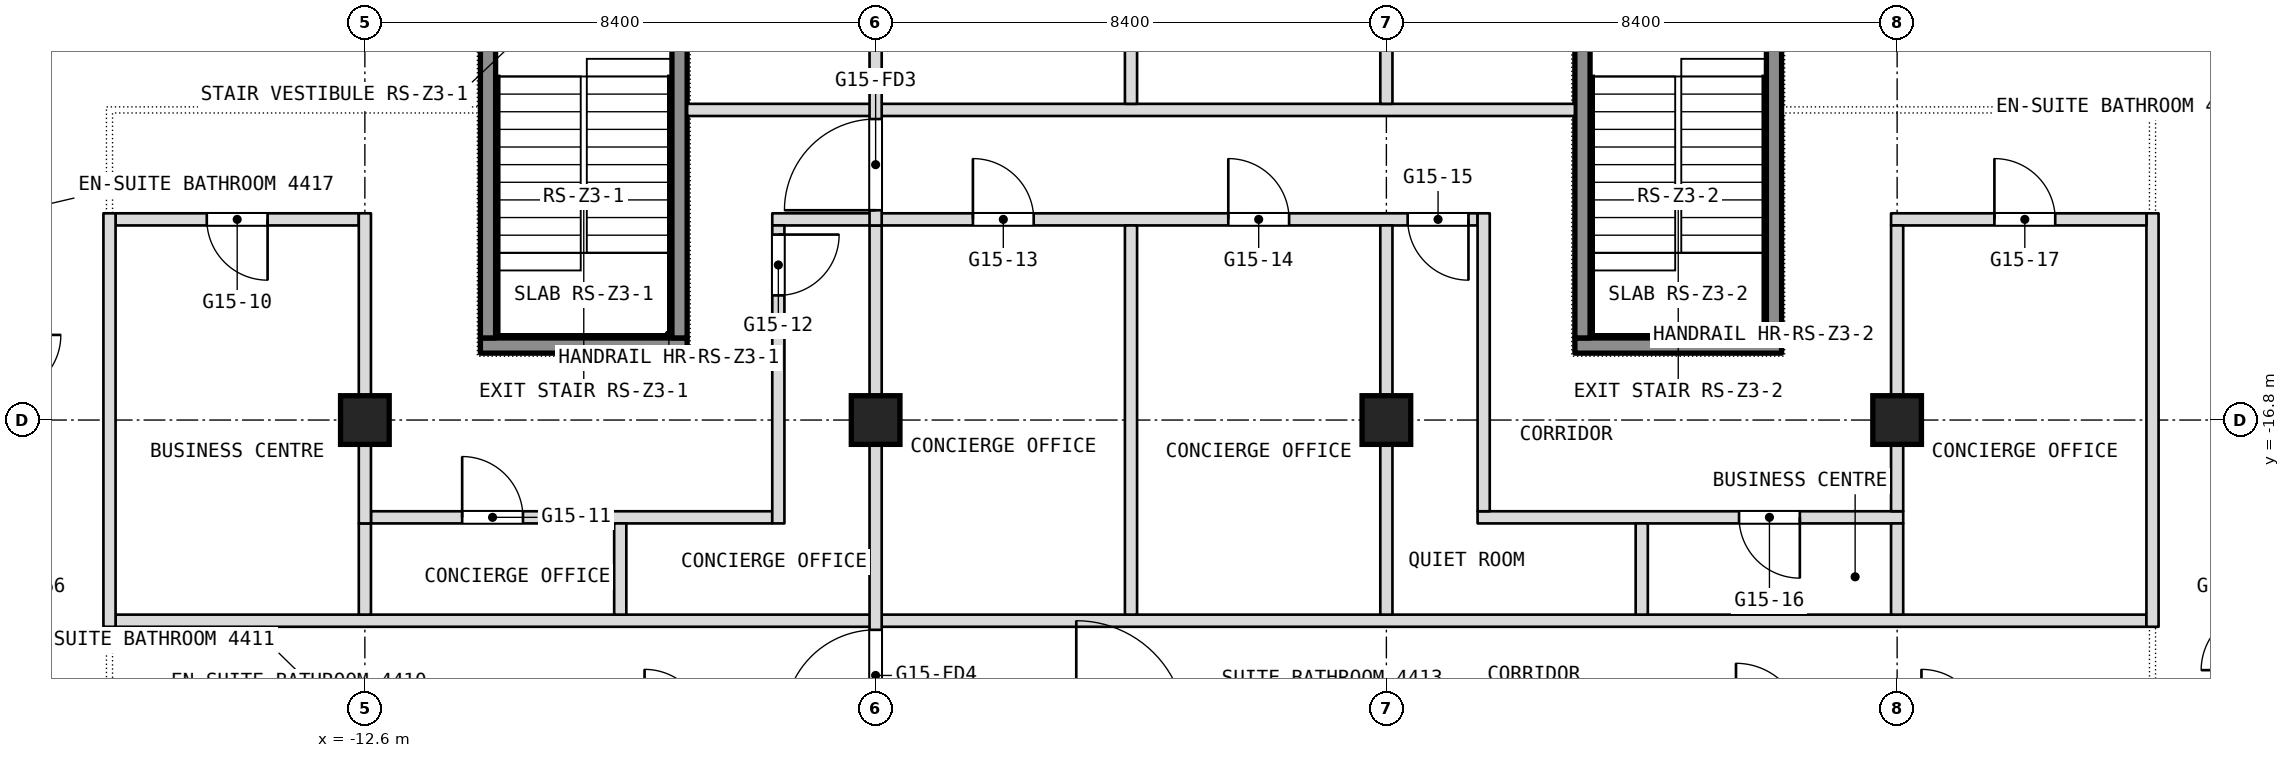
"""IFC4 building model, lengths in metres.
Left out: names, types, materials, properties, quantities, classifications, styles, units other than length and angle.
Written with IfcOpenShell. Run it as: python <this file> out.ifc"""

import sys

from ifc_helpers import new_model, si_unit, direction, frame, frame_2d, origin, origin_2d, place, context, subcontext, project, spatial, rectangle, extrude, element, fill, save


model = new_model("IFC4")
c1 = context("Model", 3, precision=1e-05, world=origin(), true_north=direction((0.0, 1.0)))
c2 = subcontext(c1, "Body", "Model", "MODEL_VIEW")
j1 = project(units=[si_unit("LENGTHUNIT", "METRE"), si_unit("PLANEANGLEUNIT", "RADIAN")], contexts=[c1])
p1 = place(None, origin())
s1 = spatial("IfcSite", under=j1, at=p1, CompositionType="ELEMENT")
p2 = place(p1, origin())
s2 = spatial("IfcBuilding", under=s1, at=p2, CompositionType="ELEMENT")
p3 = place(p2, frame((0.0, 0.0, 194.9)))
s3 = spatial("IfcBuildingStorey", under=s2, at=p3, CompositionType="ELEMENT", Elevation=194.9)
for number, where, z_axis, x_axis in (
    (1, (-12.6, -16.8, 0.0), (0.0, 0.0, 1.0), (1.0, 0.0, 0.0)),
    (2, (-4.2, -16.8, 0.0), (0.0, 0.0, 1.0), (1.0, 0.0, 0.0)),
    (3, (4.2, -16.8, 0.0), (0.0, 0.0, 1.0), (1.0, 0.0, 0.0)),
    (4, (12.6, -16.8, 0.0), (0.0, 0.0, 1.0), (1.0, 0.0, 0.0)),
):
    element("IfcColumn", number, at=place(p3, frame(where, z_axis=z_axis, x_axis=x_axis)), inside=s3, PredefinedType="COLUMN", context=c2, shape_type="SweptSolid", body=[
        extrude(rectangle(XDim=0.8, YDim=0.8, at=origin_2d()), origin(), (0.0, 0.0, 1.0), 3.6),
    ])
p4 = place(p3, frame((-16.7, -20.1, 0.0), z_axis=(0.0, 0.0, 1.0), x_axis=(1.0, 0.0, 0.0)))
e5 = element("IfcWall", 5, at=p4, inside=s3, PredefinedType="PARTITIONING", context=c2, shape_type="SweptSolid", body=[
    extrude(rectangle(XDim=33.4, YDim=0.2, at=frame_2d((16.7, 0.0))), origin(), (0.0, 0.0, 1.0), 3.34),
])
p5 = place(p3, frame((-12.5, -18.4, 0.0), z_axis=(0.0, 0.0, 1.0), x_axis=(1.0, 0.0, 0.0)))
e6 = element("IfcWall", 6, at=p5, inside=s3, PredefinedType="PARTITIONING", context=c2, shape_type="SweptSolid", body=[
    extrude(rectangle(XDim=6.6, YDim=0.2, at=frame_2d((3.3, 0.0))), origin(), (0.0, 0.0, 1.0), 3.34),
])
p6 = place(p5, frame((1.5, 0.0, 0.0)))
e7 = element("IfcOpeningElement", 7, at=p6, cuts=e6, PredefinedType="OPENING", context=c2, shape_type="SweptSolid", body=[
    extrude(rectangle(XDim=1.0, YDim=2.1, at=frame_2d((0.5, 1.05))), frame((0.0, 0.1, 0.0), z_axis=(0.0, -1.0, 0.0), x_axis=(1.0, 0.0, 0.0)), (0.0, 0.0, 1.0), 0.2),
])
p7 = place(p3, frame((5.7, -18.4, 0.0), z_axis=(0.0, 0.0, 1.0), x_axis=(1.0, 0.0, 0.0)))
e8 = element("IfcWall", 8, at=p7, inside=s3, PredefinedType="PARTITIONING", context=c2, shape_type="SweptSolid", body=[
    extrude(rectangle(XDim=7.0, YDim=0.2, at=frame_2d((3.5, 0.0))), origin(), (0.0, 0.0, 1.0), 3.34),
])
p8 = place(p7, frame((4.3, 0.0, 0.0)))
e9 = element("IfcOpeningElement", 9, at=p8, cuts=e8, PredefinedType="OPENING", context=c2, shape_type="SweptSolid", body=[
    extrude(rectangle(XDim=1.0, YDim=2.1, at=frame_2d((0.5, 1.05))), frame((0.0, 0.1, 0.0), z_axis=(0.0, -1.0, 0.0), x_axis=(1.0, 0.0, 0.0)), (0.0, 0.0, 1.0), 0.2),
])
p9 = place(p3, frame((16.8, -20.2, 0.0), z_axis=(0.0, 0.0, 1.0), x_axis=(0.0, 1.0, 0.0)))
e10 = element("IfcWall", 10, at=p9, inside=s3, PredefinedType="PARTITIONING", context=c2, shape_type="SweptSolid", body=[
    extrude(rectangle(XDim=6.8, YDim=0.2, at=frame_2d((3.4, 0.0))), origin(), (0.0, 0.0, 1.0), 3.34),
])
p10 = place(p3, frame((-16.7, -13.5, 0.0), z_axis=(0.0, 0.0, 1.0), x_axis=(1.0, 0.0, 0.0)))
e11 = element("IfcWall", 11, at=p10, inside=s3, PredefinedType="PARTITIONING", context=c2, shape_type="SweptSolid", body=[
    extrude(rectangle(XDim=4.0, YDim=0.2, at=frame_2d((2.0, 0.0))), origin(), (0.0, 0.0, 1.0), 3.34),
])
p11 = place(p10, frame((1.5, 0.0, 0.0)))
e12 = element("IfcOpeningElement", 12, at=p11, cuts=e11, PredefinedType="OPENING", context=c2, shape_type="SweptSolid", body=[
    extrude(rectangle(XDim=1.0, YDim=2.1, at=frame_2d((0.5, 1.05))), frame((0.0, 0.1, 0.0), z_axis=(0.0, -1.0, 0.0), x_axis=(1.0, 0.0, 0.0)), (0.0, 0.0, 1.0), 0.2),
])
p12 = place(p3, frame((-5.9, -13.5, 0.0), z_axis=(0.0, 0.0, 1.0), x_axis=(1.0, 0.0, 0.0)))
e13 = element("IfcWall", 13, at=p12, inside=s3, PredefinedType="PARTITIONING", context=c2, shape_type="SweptSolid", body=[
    extrude(rectangle(XDim=11.6, YDim=0.2, at=frame_2d((5.8, 0.0))), origin(), (0.0, 0.0, 1.0), 3.34),
])
p13 = place(p12, frame((3.3, 0.0, 0.0)))
e14 = element("IfcOpeningElement", 14, at=p13, cuts=e13, PredefinedType="OPENING", context=c2, shape_type="SweptSolid", body=[
    extrude(rectangle(XDim=1.0, YDim=2.1, at=frame_2d((0.5, 1.05))), frame((0.0, 0.1, 0.0), z_axis=(0.0, -1.0, 0.0), x_axis=(1.0, 0.0, 0.0)), (0.0, 0.0, 1.0), 0.2),
])
p14 = place(p12, frame((7.5, 0.0, 0.0)))
e15 = element("IfcOpeningElement", 15, at=p14, cuts=e13, PredefinedType="OPENING", context=c2, shape_type="SweptSolid", body=[
    extrude(rectangle(XDim=1.0, YDim=2.1, at=frame_2d((0.5, 1.05))), frame((0.0, 0.1, 0.0), z_axis=(0.0, -1.0, 0.0), x_axis=(1.0, 0.0, 0.0)), (0.0, 0.0, 1.0), 0.2),
])
p15 = place(p12, frame((10.45, 0.0, 0.0)))
e16 = element("IfcOpeningElement", 16, at=p15, cuts=e13, PredefinedType="OPENING", context=c2, shape_type="SweptSolid", body=[
    extrude(rectangle(XDim=1.0, YDim=2.1, at=frame_2d((0.5, 1.05))), frame((0.0, 0.1, 0.0), z_axis=(0.0, -1.0, 0.0), x_axis=(1.0, 0.0, 0.0)), (0.0, 0.0, 1.0), 0.2),
])
p16 = place(p3, frame((12.5, -13.5, 0.0), z_axis=(0.0, 0.0, 1.0), x_axis=(1.0, 0.0, 0.0)))
e17 = element("IfcWall", 17, at=p16, inside=s3, PredefinedType="PARTITIONING", context=c2, shape_type="SweptSolid", body=[
    extrude(rectangle(XDim=4.2, YDim=0.2, at=frame_2d((2.1, 0.0))), origin(), (0.0, 0.0, 1.0), 3.34),
])
p17 = place(p16, frame((1.7, 0.0, 0.0)))
e18 = element("IfcOpeningElement", 18, at=p17, cuts=e17, PredefinedType="OPENING", context=c2, shape_type="SweptSolid", body=[
    extrude(rectangle(XDim=1.0, YDim=2.1, at=frame_2d((0.5, 1.05))), frame((0.0, 0.1, 0.0), z_axis=(0.0, -1.0, 0.0), x_axis=(1.0, 0.0, 0.0)), (0.0, 0.0, 1.0), 0.2),
])
p18 = place(p3, frame((12.6, -20.0, 0.0), z_axis=(0.0, 0.0, 1.0), x_axis=(0.0, 1.0, 0.0)))
e19 = element("IfcWall", 19, at=p18, inside=s3, PredefinedType="PARTITIONING", context=c2, shape_type="SweptSolid", body=[
    extrude(rectangle(XDim=1.5, YDim=0.2, at=frame_2d((0.75, 0.0))), origin(), (0.0, 0.0, 1.0), 3.34),
])
p19 = place(p3, frame((12.6, -18.3, 0.0), z_axis=(0.0, 0.0, 1.0), x_axis=(0.0, 1.0, 0.0)))
e20 = element("IfcWall", 20, at=p19, inside=s3, PredefinedType="PARTITIONING", context=c2, shape_type="SweptSolid", body=[
    extrude(rectangle(XDim=4.7, YDim=0.2, at=frame_2d((2.35, 0.0))), origin(), (0.0, 0.0, 1.0), 3.34),
])
p20 = place(p3, frame((-7.3, -11.7, 0.0), z_axis=(0.0, 0.0, 1.0), x_axis=(1.0, 0.0, 0.0)))
e21 = element("IfcWall", 21, at=p20, inside=s3, PredefinedType="PARTITIONING", context=c2, shape_type="SweptSolid", body=[
    extrude(rectangle(XDim=14.6, YDim=0.2, at=frame_2d((7.3, 0.0))), origin(), (0.0, 0.0, 1.0), 3.34),
])
p21 = place(p3, frame((8.4, -20.0, 0.0), z_axis=(0.0, 0.0, 1.0), x_axis=(0.0, 1.0, 0.0)))
e22 = element("IfcWall", 22, at=p21, inside=s3, PredefinedType="PARTITIONING", context=c2, shape_type="SweptSolid", body=[
    extrude(rectangle(XDim=1.5, YDim=0.2, at=frame_2d((0.75, 0.0))), origin(), (0.0, 0.0, 1.0), 3.34),
])
p22 = place(p3, frame((5.8, -18.3, 0.0), z_axis=(0.0, 0.0, 1.0), x_axis=(0.0, 1.0, 0.0)))
e23 = element("IfcWall", 23, at=p22, inside=s3, PredefinedType="PARTITIONING", context=c2, shape_type="SweptSolid", body=[
    extrude(rectangle(XDim=4.9, YDim=0.2, at=frame_2d((2.45, 0.0))), origin(), (0.0, 0.0, 1.0), 3.34),
])
p23 = place(p3, frame((4.2, -20.0, 0.0), z_axis=(0.0, 0.0, 1.0), x_axis=(0.0, 1.0, 0.0)))
e24 = element("IfcWall", 24, at=p23, inside=s3, PredefinedType="PARTITIONING", context=c2, shape_type="SweptSolid", body=[
    extrude(rectangle(XDim=6.4, YDim=0.2, at=frame_2d((3.2, 0.0))), origin(), (0.0, 0.0, 1.0), 3.34),
])
p24 = place(p3, frame((4.2, -11.6, 0.0), z_axis=(0.0, 0.0, 1.0), x_axis=(0.0, 1.0, 0.0)))
e25 = element("IfcWall", 25, at=p24, inside=s3, PredefinedType="PARTITIONING", context=c2, shape_type="SweptSolid", body=[
    extrude(rectangle(XDim=9.7, YDim=0.2, at=frame_2d((4.85, 0.0))), origin(), (0.0, 0.0, 1.0), 3.34),
])
p25 = place(p3, frame((0.0, -20.0, 0.0), z_axis=(0.0, 0.0, 1.0), x_axis=(0.0, 1.0, 0.0)))
e26 = element("IfcWall", 26, at=p25, inside=s3, PredefinedType="PARTITIONING", context=c2, shape_type="SweptSolid", body=[
    extrude(rectangle(XDim=6.4, YDim=0.2, at=frame_2d((3.2, 0.0))), origin(), (0.0, 0.0, 1.0), 3.34),
])
p26 = place(p3, frame((0.0, -11.6, 0.0), z_axis=(0.0, 0.0, 1.0), x_axis=(0.0, 1.0, 0.0)))
e27 = element("IfcWall", 27, at=p26, inside=s3, PredefinedType="PARTITIONING", context=c2, shape_type="SweptSolid", body=[
    extrude(rectangle(XDim=9.7, YDim=0.2, at=frame_2d((4.85, 0.0))), origin(), (0.0, 0.0, 1.0), 3.34),
])
p27 = place(p3, frame((-4.2, -22.0, 0.0), z_axis=(0.0, 0.0, 1.0), x_axis=(0.0, 1.0, 0.0)))
e28 = element("IfcWall", 28, at=p27, inside=s3, PredefinedType="PARTITIONING", context=c2, shape_type="SweptSolid", body=[
    extrude(rectangle(XDim=8.4, YDim=0.2, at=frame_2d((4.2, 0.0))), origin(), (0.0, 0.0, 1.0), 3.34),
])
p28 = place(p27, frame((0.25, 0.0, 0.0)))
e29 = element("IfcOpeningElement", 29, at=p28, cuts=e28, PredefinedType="OPENING", context=c2, shape_type="SweptSolid", body=[
    extrude(rectangle(XDim=1.5, YDim=2.1, at=frame_2d((0.75, 1.05))), frame((0.0, 0.1, 0.0), z_axis=(0.0, -1.0, 0.0), x_axis=(1.0, 0.0, 0.0)), (0.0, 0.0, 1.0), 0.2),
])
p29 = place(p3, frame((-4.2, -13.6, 0.0), z_axis=(0.0, 0.0, 1.0), x_axis=(0.0, 1.0, 0.0)))
e30 = element("IfcWall", 30, at=p29, inside=s3, PredefinedType="PARTITIONING", context=c2, shape_type="SweptSolid", body=[
    extrude(rectangle(XDim=13.6, YDim=0.2, at=frame_2d((6.8, 0.0))), origin(), (0.0, 0.0, 1.0), 3.34),
])
p30 = place(p29, frame((11.95, 0.0, 0.0)))
e31 = element("IfcOpeningElement", 31, at=p30, cuts=e30, PredefinedType="OPENING", context=c2, shape_type="SweptSolid", body=[
    extrude(rectangle(XDim=1.5, YDim=2.1, at=frame_2d((0.75, 1.05))), frame((0.0, 0.1, 0.0), z_axis=(0.0, -1.0, 0.0), x_axis=(1.0, 0.0, 0.0)), (0.0, 0.0, 1.0), 0.2),
])
p31 = place(p29, frame((0.25, 0.0, 0.0)))
e32 = element("IfcOpeningElement", 32, at=p31, cuts=e30, PredefinedType="OPENING", context=c2, shape_type="SweptSolid", body=[
    extrude(rectangle(XDim=1.5, YDim=2.1, at=frame_2d((0.75, 1.05))), frame((0.0, 0.1, 0.0), z_axis=(0.0, -1.0, 0.0), x_axis=(1.0, 0.0, 0.0)), (0.0, 0.0, 1.0), 0.2),
])
p32 = place(p3, frame((-5.8, -18.5, 0.0), z_axis=(0.0, 0.0, 1.0), x_axis=(0.0, 1.0, 0.0)))
e33 = element("IfcWall", 33, at=p32, inside=s3, PredefinedType="PARTITIONING", context=c2, shape_type="SweptSolid", body=[
    extrude(rectangle(XDim=4.9, YDim=0.2, at=frame_2d((2.45, 0.0))), origin(), (0.0, 0.0, 1.0), 3.34),
])
p33 = place(p32, frame((3.75, 0.0, 0.0)))
e34 = element("IfcOpeningElement", 34, at=p33, cuts=e33, PredefinedType="OPENING", context=c2, shape_type="SweptSolid", body=[
    extrude(rectangle(XDim=1.0, YDim=2.1, at=frame_2d((0.5, 1.05))), frame((0.0, 0.1, 0.0), z_axis=(0.0, -1.0, 0.0), x_axis=(1.0, 0.0, 0.0)), (0.0, 0.0, 1.0), 0.2),
])
for number, where, z_axis, x_axis in (
    (35, (-8.4, -20.0, 0.0), (0.0, 0.0, 1.0), (0.0, 1.0, 0.0)),
    (36, (-12.6, -20.0, 0.0), (0.0, 0.0, 1.0), (0.0, 1.0, 0.0)),
):
    element("IfcWall", number, at=place(p3, frame(where, z_axis=z_axis, x_axis=x_axis)), inside=s3, PredefinedType="PARTITIONING", context=c2, shape_type="SweptSolid", body=[
        extrude(rectangle(XDim=1.5, YDim=0.2, at=frame_2d((0.75, 0.0))), origin(), (0.0, 0.0, 1.0), 3.34),
    ])
p34 = place(p3, frame((-12.6, -18.5, 0.0), z_axis=(0.0, 0.0, 1.0), x_axis=(0.0, 1.0, 0.0)))
e37 = element("IfcWall", 37, at=p34, inside=s3, PredefinedType="PARTITIONING", context=c2, shape_type="SweptSolid", body=[
    extrude(rectangle(XDim=5.1, YDim=0.2, at=frame_2d((2.55, 0.0))), origin(), (0.0, 0.0, 1.0), 3.34),
])
p35 = place(p3, frame((-16.8, -20.2, 0.0), z_axis=(0.0, 0.0, 1.0), x_axis=(0.0, 1.0, 0.0)))
e38 = element("IfcWall", 38, at=p35, inside=s3, PredefinedType="PARTITIONING", context=c2, shape_type="SweptSolid", body=[
    extrude(rectangle(XDim=6.8, YDim=0.2, at=frame_2d((3.4, 0.0))), origin(), (0.0, 0.0, 1.0), 3.34),
])
p36 = place(p3, frame((-10.7, -15.575, 0.1), z_axis=(0.0, 0.0, 1.0), x_axis=(1.0, 0.0, 0.0)))
e39 = element("IfcWall", 39, at=p36, inside=s3, PredefinedType="SHEAR", context=c2, shape_type="SweptSolid", body=[
    extrude(rectangle(XDim=3.4, YDim=0.25, at=frame_2d((1.7, 0.0))), origin(), (0.0, 0.0, 1.0), 3.6),
])
for number, where, z_axis, x_axis in (
    (40, (-10.575, -15.45, 0.1), (0.0, 0.0, 1.0), (0.0, 1.0, 0.0)),
    (41, (-7.425, -15.45, 0.1), (0.0, 0.0, 1.0), (0.0, 1.0, 0.0)),
):
    element("IfcWall", number, at=place(p3, frame(where, z_axis=z_axis, x_axis=x_axis)), inside=s3, PredefinedType="SHEAR", context=c2, shape_type="SweptSolid", body=[
        extrude(rectangle(XDim=5.7, YDim=0.25, at=frame_2d((2.85, 0.0))), origin(), (0.0, 0.0, 1.0), 3.6),
    ])
p37 = place(p3, frame((7.3, -15.575, 0.1), z_axis=(0.0, 0.0, 1.0), x_axis=(1.0, 0.0, 0.0)))
e42 = element("IfcWall", 42, at=p37, inside=s3, PredefinedType="SHEAR", context=c2, shape_type="SweptSolid", body=[
    extrude(rectangle(XDim=3.4, YDim=0.25, at=frame_2d((1.7, 0.0))), origin(), (0.0, 0.0, 1.0), 3.6),
])
for number, where, z_axis, x_axis in (
    (43, (7.425, -15.45, 0.1), (0.0, 0.0, 1.0), (0.0, 1.0, 0.0)),
    (44, (10.575, -15.45, 0.1), (0.0, 0.0, 1.0), (0.0, 1.0, 0.0)),
):
    element("IfcWall", number, at=place(p3, frame(where, z_axis=z_axis, x_axis=x_axis)), inside=s3, PredefinedType="SHEAR", context=c2, shape_type="SweptSolid", body=[
        extrude(rectangle(XDim=5.7, YDim=0.25, at=frame_2d((2.85, 0.0))), origin(), (0.0, 0.0, 1.0), 3.6),
    ])
p38 = place(p6, origin())
e45 = element("IfcDoor", 45, at=p38, inside=s3, OperationType="SINGLE_SWING_RIGHT", PredefinedType="DOOR", context=c2, shape_type="SweptSolid", body=[
    extrude(rectangle(XDim=1.0, YDim=2.1, at=frame_2d((0.5, 1.05))), frame((0.0, 0.025, 0.0), z_axis=(0.0, -1.0, 0.0), x_axis=(1.0, 0.0, 0.0)), (0.0, 0.0, 1.0), 0.05),
])
fill(e7, e45)
p39 = place(p8, origin())
e46 = element("IfcDoor", 46, at=p39, inside=s3, OperationType="SINGLE_SWING_LEFT", PredefinedType="DOOR", context=c2, shape_type="SweptSolid", body=[
    extrude(rectangle(XDim=1.0, YDim=2.1, at=frame_2d((0.5, 1.05))), frame((0.0, 0.025, 0.0), z_axis=(0.0, -1.0, 0.0), x_axis=(1.0, 0.0, 0.0)), (0.0, 0.0, 1.0), 0.05),
])
fill(e9, e46)
p40 = place(p11, origin())
e47 = element("IfcDoor", 47, at=p40, inside=s3, OperationType="SINGLE_SWING_RIGHT", PredefinedType="DOOR", context=c2, shape_type="SweptSolid", body=[
    extrude(rectangle(XDim=1.0, YDim=2.1, at=frame_2d((0.5, 1.05))), frame((0.0, 0.025, 0.0), z_axis=(0.0, -1.0, 0.0), x_axis=(1.0, 0.0, 0.0)), (0.0, 0.0, 1.0), 0.05),
])
fill(e12, e47)
p41 = place(p13, origin())
e48 = element("IfcDoor", 48, at=p41, inside=s3, OperationType="SINGLE_SWING_LEFT", PredefinedType="DOOR", context=c2, shape_type="SweptSolid", body=[
    extrude(rectangle(XDim=1.0, YDim=2.1, at=frame_2d((0.5, 1.05))), frame((0.0, 0.025, 0.0), z_axis=(0.0, -1.0, 0.0), x_axis=(1.0, 0.0, 0.0)), (0.0, 0.0, 1.0), 0.05),
])
fill(e14, e48)
p42 = place(p14, origin())
e49 = element("IfcDoor", 49, at=p42, inside=s3, OperationType="SINGLE_SWING_RIGHT", PredefinedType="DOOR", context=c2, shape_type="SweptSolid", body=[
    extrude(rectangle(XDim=1.0, YDim=2.1, at=frame_2d((0.5, 1.05))), frame((0.0, 0.025, 0.0), z_axis=(0.0, -1.0, 0.0), x_axis=(1.0, 0.0, 0.0)), (0.0, 0.0, 1.0), 0.05),
])
fill(e15, e49)
p43 = place(p15, origin())
e50 = element("IfcDoor", 50, at=p43, inside=s3, OperationType="SINGLE_SWING_LEFT", PredefinedType="DOOR", context=c2, shape_type="SweptSolid", body=[
    extrude(rectangle(XDim=1.0, YDim=2.1, at=frame_2d((0.5, 1.05))), frame((0.0, 0.025, 0.0), z_axis=(0.0, -1.0, 0.0), x_axis=(1.0, 0.0, 0.0)), (0.0, 0.0, 1.0), 0.05),
])
fill(e16, e50)
p44 = place(p17, origin())
e51 = element("IfcDoor", 51, at=p44, inside=s3, OperationType="SINGLE_SWING_LEFT", PredefinedType="DOOR", context=c2, shape_type="SweptSolid", body=[
    extrude(rectangle(XDim=1.0, YDim=2.1, at=frame_2d((0.5, 1.05))), frame((0.0, 0.025, 0.0), z_axis=(0.0, -1.0, 0.0), x_axis=(1.0, 0.0, 0.0)), (0.0, 0.0, 1.0), 0.05),
])
fill(e18, e51)
p45 = place(p33, origin())
e52 = element("IfcDoor", 52, at=p45, inside=s3, OperationType="SINGLE_SWING_RIGHT", PredefinedType="DOOR", context=c2, shape_type="SweptSolid", body=[
    extrude(rectangle(XDim=1.0, YDim=2.1, at=frame_2d((0.5, 1.05))), frame((0.0, 0.025, 0.0), z_axis=(0.0, -1.0, 0.0), x_axis=(1.0, 0.0, 0.0)), (0.0, 0.0, 1.0), 0.05),
])
fill(e34, e52)
p46 = place(p31, origin())
e53 = element("IfcDoor", 53, at=p46, inside=s3, OperationType="DOUBLE_DOOR_DOUBLE_SWING", PredefinedType="DOOR", context=c2, shape_type="SweptSolid", body=[
    extrude(rectangle(XDim=1.5, YDim=2.1, at=frame_2d((0.75, 1.05))), frame((0.0, 0.025, 0.0), z_axis=(0.0, -1.0, 0.0), x_axis=(1.0, 0.0, 0.0)), (0.0, 0.0, 1.0), 0.05),
])
fill(e32, e53)
p47 = place(p28, origin())
e54 = element("IfcDoor", 54, at=p47, inside=s3, OperationType="DOUBLE_DOOR_DOUBLE_SWING", PredefinedType="DOOR", context=c2, shape_type="SweptSolid", body=[
    extrude(rectangle(XDim=1.5, YDim=2.1, at=frame_2d((0.75, 1.05))), frame((0.0, 0.025, 0.0), z_axis=(0.0, -1.0, 0.0), x_axis=(1.0, 0.0, 0.0)), (0.0, 0.0, 1.0), 0.05),
])
fill(e29, e54)
save(model, sys.argv[1])
